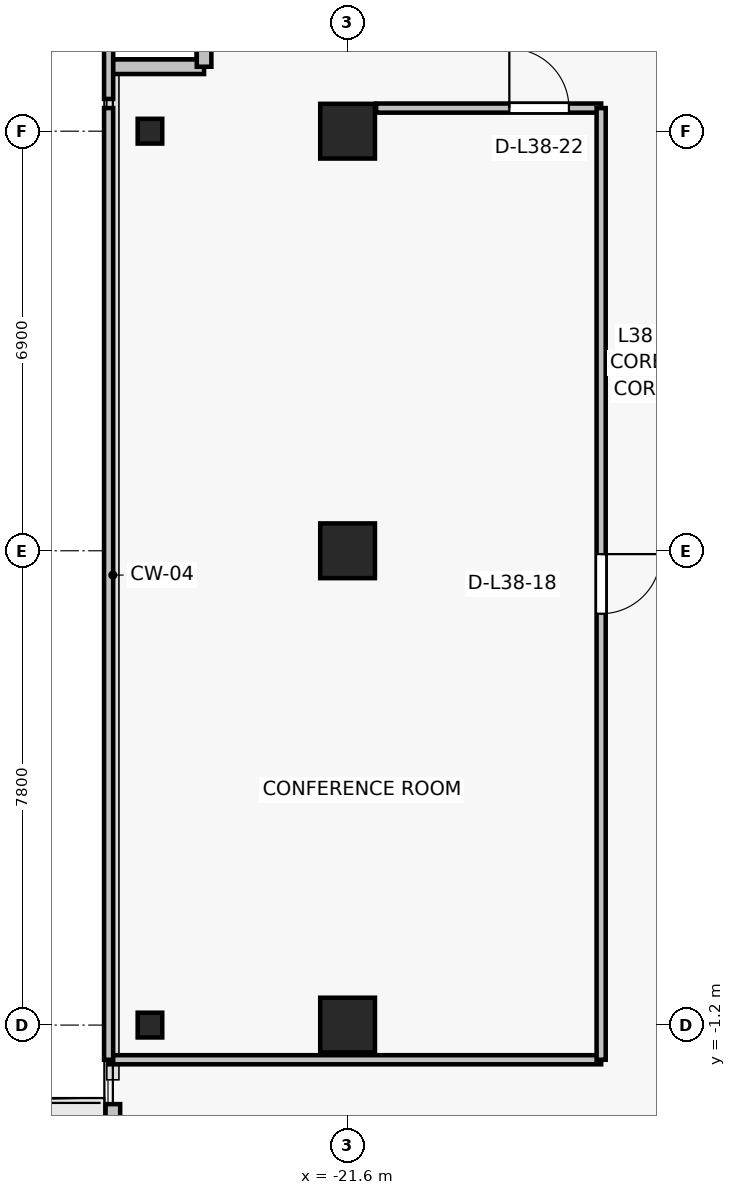
"""IFC4 building model, lengths in metres.
Left out: names, types, materials, properties, quantities, classifications, styles, units other than length and angle.
Written with IfcOpenShell. Run it as: python <this file> out.ifc"""

import sys

from ifc_helpers import new_model, si_unit, direction, frame, frame_2d, origin, origin_2d, place, context, subcontext, project, spatial, rectangle, i_section, extrude, source, transform, mapped, element, fill, save


model = new_model("IFC4")
c1 = context("Model", 3, precision=1e-05, world=origin(), true_north=direction((0.0, 1.0)))
c2 = subcontext(c1, "Body", "Model", "MODEL_VIEW")
j1 = project(units=[si_unit("LENGTHUNIT", "METRE"), si_unit("PLANEANGLEUNIT", "RADIAN")], contexts=[c1])
p1 = place(None, origin())
s1 = spatial("IfcSite", under=j1, at=p1, CompositionType="ELEMENT")
p2 = place(p1, origin())
s2 = spatial("IfcBuilding", under=s1, at=p2, CompositionType="ELEMENT")
p3 = place(p2, frame((0.0, 0.0, 136.3)))
s3 = spatial("IfcBuildingStorey", under=s2, at=p3, CompositionType="ELEMENT", Elevation=136.3)
for number, where, z_axis, x_axis in (
    (1, (-21.6, -1.2, 0.0), (0.0, 0.0, 1.0), (1.0, 0.0, 0.0)),
    (2, (-21.6, 6.6, 0.0), (0.0, 0.0, 1.0), (1.0, 0.0, 0.0)),
    (3, (-21.6, 13.5, 0.0), (0.0, 0.0, 1.0), (1.0, 0.0, 0.0)),
):
    element("IfcColumn", number, at=place(p3, frame(where, z_axis=z_axis, x_axis=x_axis)), inside=s3, PredefinedType="COLUMN", context=c2, shape_type="SweptSolid", body=[
        extrude(rectangle(XDim=0.9, YDim=0.9, at=origin_2d()), origin(), (0.0, 0.0, 1.0), 3.3),
    ])
for number, where, z_axis, x_axis in (
    (4, (-24.85, -1.2, 0.0), (0.0, 0.0, 1.0), (1.0, 0.0, 0.0)),
    (5, (-24.85, 13.5, 0.0), (0.0, 0.0, 1.0), (1.0, 0.0, 0.0)),
):
    element("IfcColumn", number, at=place(p3, frame(where, z_axis=z_axis, x_axis=x_axis)), inside=s3, PredefinedType="COLUMN", context=c2, shape_type="SweptSolid", body=[
        extrude(i_section(OverallWidth=0.404, OverallDepth=0.407, WebThickness=0.022, FlangeThickness=0.032, FilletRadius=0.015, at=origin_2d()), origin(), (0.0, 0.0, 1.0), 3.3),
    ])
p4 = place(p3, frame((-25.46, -8.3, 0.0), z_axis=(0.0, 0.0, 1.0), x_axis=(0.0, 1.0, 0.0)))
e6 = element("IfcWall", 6, at=p4, inside=s3, PredefinedType="SOLIDWALL", context=c2, shape_type="SweptSolid", body=[
    extrude(rectangle(XDim=5.8, YDim=0.24, at=frame_2d((2.9, 0.0))), origin(), (0.0, 0.0, 1.0), 3.05),
])
p5 = place(p4, frame((0.696, 0.0, 0.0)))
e7 = element("IfcOpeningElement", 7, at=p5, cuts=e6, PredefinedType="OPENING", context=c2, shape_type="SweptSolid", body=[
    extrude(rectangle(XDim=1.0, YDim=2.2, at=frame_2d((0.5, 1.1))), frame((0.0, 0.13, 0.0), z_axis=(0.0, -1.0, 0.0), x_axis=(1.0, 0.0, 0.0)), (0.0, 0.0, 1.0), 0.26),
])
p6 = place(p4, frame((2.046, 0.0, 0.85)))
e8 = element("IfcOpeningElement", 8, at=p6, cuts=e6, PredefinedType="OPENING", context=c2, shape_type="SweptSolid", body=[
    extrude(rectangle(XDim=0.9, YDim=1.35, at=frame_2d((0.45, 0.675))), frame((0.0, 0.13, 0.0), z_axis=(0.0, -1.0, 0.0), x_axis=(1.0, 0.0, 0.0)), (0.0, 0.0, 1.0), 0.26),
])
for number, where, z_axis, x_axis in (
    (9, (-23.96, 14.56, 0.0), (0.0, 0.0, 1.0), (-1.0, 0.0, 0.0)),
    (10, (-23.96, 16.06, 0.0), (0.0, 0.0, 1.0), (0.0, -1.0, 0.0)),
):
    element("IfcWall", number, at=place(p3, frame(where, z_axis=z_axis, x_axis=x_axis)), inside=s3, PredefinedType="SOLIDWALL", context=c2, shape_type="SweptSolid", body=[
        extrude(rectangle(XDim=1.5, YDim=0.24, at=frame_2d((0.75, 0.0))), origin(), (0.0, 0.0, 1.0), 3.05),
    ])
p7 = place(p3, frame((-17.43, -1.77, 0.0), z_axis=(0.0, 0.0, 1.0), x_axis=(-1.0, 0.0, 0.0)))
e11 = element("IfcWall", 11, at=p7, inside=s3, PredefinedType="PARTITIONING", context=c2, shape_type="SweptSolid", body=[
    extrude(rectangle(XDim=8.1, YDim=0.15, at=frame_2d((4.05, 0.0))), origin(), (0.0, 0.0, 1.0), 2.49),
])
p8 = place(p3, frame((-21.13, 13.88, 0.0), z_axis=(0.0, 0.0, 1.0), x_axis=(1.0, 0.0, 0.0)))
e12 = element("IfcWall", 12, at=p8, inside=s3, PredefinedType="PARTITIONING", context=c2, shape_type="SweptSolid", body=[
    extrude(rectangle(XDim=3.7, YDim=0.15, at=frame_2d((1.85, 0.0))), origin(), (0.0, 0.0, 1.0), 3.05),
])
p9 = place(p8, frame((2.19, 0.0, 0.0)))
e13 = element("IfcOpeningElement", 13, at=p9, cuts=e12, PredefinedType="OPENING", context=c2, shape_type="SweptSolid", body=[
    extrude(rectangle(XDim=0.98, YDim=2.15, at=frame_2d((0.49, 1.075))), frame((0.0, 0.085, 0.0), z_axis=(0.0, -1.0, 0.0), x_axis=(1.0, 0.0, 0.0)), (0.0, 0.0, 1.0), 0.17),
])
p10 = place(p3, frame((-25.53, -1.77, 0.0), z_axis=(0.0, 0.0, 1.0), x_axis=(0.0, 1.0, 0.0)))
e14 = element("IfcWall", 14, at=p10, inside=s3, PredefinedType="PARTITIONING", context=c2, shape_type="SweptSolid", body=[
    extrude(rectangle(XDim=15.65, YDim=0.15, at=frame_2d((7.825, 0.0))), origin(), (0.0, 0.0, 1.0), 3.05),
])
p11 = place(p3, frame((-17.43, 13.88, 0.0), z_axis=(0.0, 0.0, 1.0), x_axis=(0.0, -1.0, 0.0)))
e15 = element("IfcWall", 15, at=p11, inside=s3, PredefinedType="PARTITIONING", context=c2, shape_type="SweptSolid", body=[
    extrude(rectangle(XDim=15.65, YDim=0.15, at=frame_2d((7.825, 0.0))), origin(), (0.0, 0.0, 1.0), 2.49),
])
p12 = place(p11, frame((7.335, 0.0, 0.0)))
e16 = element("IfcOpeningElement", 16, at=p12, cuts=e15, PredefinedType="OPENING", context=c2, shape_type="SweptSolid", body=[
    extrude(rectangle(XDim=0.98, YDim=2.15, at=frame_2d((0.49, 1.075))), frame((0.0, 0.085, 0.0), z_axis=(0.0, -1.0, 0.0), x_axis=(1.0, 0.0, 0.0)), (0.0, 0.0, 1.0), 0.17),
])
p13 = place(p3, frame((-25.53, 14.03, 0.0), z_axis=(0.0, 0.0, 1.0), x_axis=(0.0, 1.0, 0.0)))
e17 = element("IfcWall", 17, at=p13, inside=s3, PredefinedType="PARTITIONING", context=c2, shape_type="SweptSolid", body=[
    extrude(rectangle(XDim=3.6, YDim=0.15, at=frame_2d((1.8, 0.0))), origin(), (0.0, 0.0, 1.0), 3.05),
])
m1 = source(origin(), c2, "Body", "SweptSolid", [
    extrude(rectangle(XDim=0.98, YDim=2.15, at=frame_2d((0.49, 1.075))), frame((0.0, 0.025, 0.0), z_axis=(0.0, -1.0, 0.0), x_axis=(1.0, 0.0, 0.0)), (0.0, 0.0, 1.0), 0.05),
])
p14 = place(p12, origin())
e18 = element("IfcDoor", 18, at=p14, inside=s3, OperationType="SINGLE_SWING_LEFT", PredefinedType="DOOR", context=c2, shape_type="MappedRepresentation", body=[
    mapped(m1, transform((0.0, 0.0, 0.0), x_axis=(1.0, 0.0, 0.0), y_axis=(0.0, 1.0, 0.0), z_axis=(0.0, 0.0, 1.0), scale=1.0)),
])
fill(e16, e18)
p15 = place(p9, origin())
e19 = element("IfcDoor", 19, at=p15, inside=s3, OperationType="SINGLE_SWING_LEFT", PredefinedType="DOOR", context=c2, shape_type="MappedRepresentation", body=[
    mapped(m1, transform((0.0, 0.0, 0.0), x_axis=(1.0, 0.0, 0.0), y_axis=(0.0, 1.0, 0.0), z_axis=(0.0, 0.0, 1.0), scale=1.0)),
])
fill(e13, e19)
save(model, sys.argv[1])
